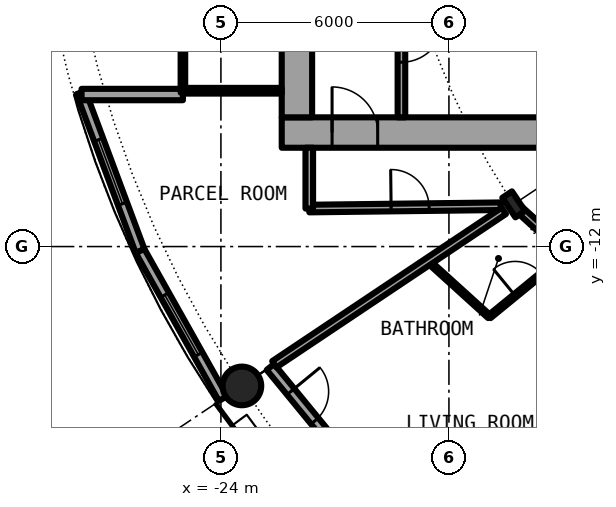
"""IFC4 building model, lengths in metres.
Left out: names, types, materials, properties, quantities, classifications, styles, units other than length and angle.
Written with IfcOpenShell. Run it as: python <this file> out.ifc"""

import sys

from ifc_helpers import new_model, si_unit, direction, frame, frame_2d, origin, origin_2d, place, context, subcontext, project, spatial, rectangle, hollow_circle, i_section, extrude, element, fill, save


model = new_model("IFC4")
c1 = context("Model", 3, precision=1e-05, world=origin(), true_north=direction((0.0, 1.0)))
c2 = subcontext(c1, "Body", "Model", "MODEL_VIEW")
j1 = project(units=[si_unit("LENGTHUNIT", "METRE"), si_unit("PLANEANGLEUNIT", "RADIAN")], contexts=[c1])
p1 = place(None, origin())
s1 = spatial("IfcSite", under=j1, at=p1, CompositionType="ELEMENT")
p2 = place(p1, origin())
s2 = spatial("IfcBuilding", under=s1, at=p2, CompositionType="ELEMENT")
p3 = place(p2, frame((0.0, 0.0, 31.95)))
s3 = spatial("IfcBuildingStorey", under=s2, at=p3, CompositionType="ELEMENT", Elevation=31.95)
p4 = place(p3, frame((-23.448, -15.667, 0.0), z_axis=(0.0, 0.0, 1.0), x_axis=(1.0, 0.0, 0.0)))
e1 = element("IfcColumn", 1, at=p4, inside=s3, PredefinedType="COLUMN", context=c2, shape_type="SweptSolid", body=[
    extrude(hollow_circle(Radius=0.508, WallThickness=0.05, at=origin_2d()), origin(), (0.0, 0.0, 1.0), 3.05),
])
p5 = place(p3, frame((-16.297, -10.889, 0.0), z_axis=(0.0, 0.0, 1.0), x_axis=(-0.831469612303, -0.55557023302, 0.0)))
e2 = element("IfcColumn", 2, at=p5, inside=s3, PredefinedType="COLUMN", context=c2, shape_type="SweptSolid", body=[
    extrude(i_section(OverallWidth=0.305, OverallDepth=0.62, WebThickness=0.021, FlangeThickness=0.04, FilletRadius=0.027, at=origin_2d()), origin(), (0.0, 0.0, 1.0), 3.05),
])
p6 = place(p3, frame((-22.699, -15.167, 0.0), z_axis=(0.0, 0.0, 1.0), x_axis=(0.634382322723, -0.773019449054, 0.0)))
e3 = element("IfcWall", 3, at=p6, inside=s3, PredefinedType="SOLIDWALL", context=c2, shape_type="SweptSolid", body=[
    extrude(rectangle(XDim=5.352, YDim=0.25, at=frame_2d((2.676, 0.0))), origin(), (0.0, 0.0, 1.0), 2.7),
])
p7 = place(p6, frame((0.841, 0.0, 0.0)))
e4 = element("IfcOpeningElement", 4, at=p7, cuts=e3, PredefinedType="OPENING", context=c2, shape_type="SweptSolid", body=[
    extrude(rectangle(XDim=1.0, YDim=2.2, at=frame_2d((0.5, 1.1))), frame((0.0, 0.135, 0.0), z_axis=(0.0, -1.0, 0.0), x_axis=(1.0, 0.0, 0.0)), (0.0, 0.0, 1.0), 0.27),
])
p8 = place(p6, frame((3.111, 0.0, 0.3)))
e5 = element("IfcOpeningElement", 5, at=p8, cuts=e3, PredefinedType="OPENING", context=c2, shape_type="SweptSolid", body=[
    extrude(rectangle(XDim=1.8, YDim=2.1, at=frame_2d((0.9, 1.05))), frame((0.0, 0.135, 0.0), z_axis=(0.0, -1.0, 0.0), x_axis=(1.0, 0.0, 0.0)), (0.0, 0.0, 1.0), 0.27),
])
p9 = place(p3, frame((-27.682, -7.945, 0.0), z_axis=(0.0, 0.0, 1.0), x_axis=(0.349247811493, -0.937030397675, 0.0)))
e6 = element("IfcWall", 6, at=p9, inside=s3, PredefinedType="SOLIDWALL", context=c2, shape_type="SweptSolid", body=[
    extrude(rectangle(XDim=4.452, YDim=0.25, at=frame_2d((2.226, 0.0))), origin(), (0.0, 0.0, 1.0), 2.7),
])
p10 = place(p9, frame((1.327, 0.0, 0.3)))
e7 = element("IfcOpeningElement", 7, at=p10, cuts=e6, PredefinedType="OPENING", context=c2, shape_type="SweptSolid", body=[
    extrude(rectangle(XDim=1.8, YDim=2.1, at=frame_2d((0.9, 1.05))), frame((0.0, 0.135, 0.0), z_axis=(0.0, -1.0, 0.0), x_axis=(1.0, 0.0, 0.0)), (0.0, 0.0, 1.0), 0.27),
])
p11 = place(p3, frame((-26.127, -12.117, 0.0), z_axis=(0.0, 0.0, 1.0), x_axis=(0.489696356642, -0.871893042919, 0.0)))
e8 = element("IfcWall", 8, at=p11, inside=s3, PredefinedType="SOLIDWALL", context=c2, shape_type="SweptSolid", body=[
    extrude(rectangle(XDim=4.454, YDim=0.25, at=frame_2d((2.227, 0.0))), origin(), (0.0, 0.0, 1.0), 2.7),
])
p12 = place(p11, frame((1.327, 0.0, 0.3)))
e9 = element("IfcOpeningElement", 9, at=p12, cuts=e8, PredefinedType="OPENING", context=c2, shape_type="SweptSolid", body=[
    extrude(rectangle(XDim=1.8, YDim=2.1, at=frame_2d((0.9, 1.05))), frame((0.0, 0.135, 0.0), z_axis=(0.0, -1.0, 0.0), x_axis=(1.0, 0.0, 0.0)), (0.0, 0.0, 1.0), 0.27),
])
p13 = place(p3, frame((-25.0, -8.0, 0.0), z_axis=(0.0, 0.0, 1.0), x_axis=(-1.0, 0.0, 0.0)))
e10 = element("IfcWall", 10, at=p13, inside=s3, PredefinedType="SOLIDWALL", context=c2, shape_type="SweptSolid", body=[
    extrude(rectangle(XDim=2.667, YDim=0.3, at=frame_2d((1.333, 0.0))), origin(), (0.0, 0.0, 1.0), 2.7),
])
p14 = place(p3, frame((-22.4, -9.0, 0.0), z_axis=(0.0, 0.0, 1.0), x_axis=(1.0, 0.0, 0.0)))
e11 = element("IfcWall", 11, at=p14, inside=s3, PredefinedType="SHEAR", context=c2, shape_type="SweptSolid", body=[
    extrude(rectangle(XDim=14.2, YDim=0.8, at=frame_2d((7.1, 0.0))), origin(), (0.0, 0.0, 1.0), 3.05),
])
p15 = place(p14, frame((1.325, 0.0, 0.0)))
e12 = element("IfcOpeningElement", 12, at=p15, cuts=e11, PredefinedType="OPENING", context=c2, shape_type="SweptSolid", body=[
    extrude(rectangle(XDim=1.2, YDim=2.3, at=frame_2d((0.6, 1.15))), frame((0.0, 0.41, 0.0), z_axis=(0.0, -1.0, 0.0), x_axis=(1.0, 0.0, 0.0)), (0.0, 0.0, 1.0), 0.82),
])
p16 = place(p3, frame((-22.0, -8.6, 0.0), z_axis=(0.0, 0.0, 1.0), x_axis=(0.0, 1.0, 0.0)))
e13 = element("IfcWall", 13, at=p16, inside=s3, PredefinedType="SHEAR", context=c2, shape_type="SweptSolid", body=[
    extrude(rectangle(XDim=17.2, YDim=0.8, at=frame_2d((8.6, 0.0))), origin(), (0.0, 0.0, 1.0), 3.05),
])
p17 = place(p16, frame((7.7, 0.0, 0.0)))
e14 = element("IfcOpeningElement", 14, at=p17, cuts=e13, PredefinedType="OPENING", context=c2, shape_type="SweptSolid", body=[
    extrude(rectangle(XDim=1.8, YDim=2.3, at=frame_2d((0.9, 1.15))), frame((0.0, 0.41, 0.0), z_axis=(0.0, -1.0, 0.0), x_axis=(1.0, 0.0, 0.0)), (0.0, 0.0, 1.0), 0.82),
])
p18 = place(p3, frame((-19.25, -1.575, 0.0), z_axis=(0.0, 0.0, 1.0), x_axis=(0.0, -1.0, 0.0)))
e15 = element("IfcWall", 15, at=p18, inside=s3, PredefinedType="SOLIDWALL", context=c2, shape_type="SweptSolid", body=[
    extrude(rectangle(XDim=7.025, YDim=0.2, at=frame_2d((3.513, 0.0))), origin(), (0.0, 0.0, 1.0), 2.7),
])
p19 = place(p18, frame((4.475, 0.0, 0.0)))
e16 = element("IfcOpeningElement", 16, at=p19, cuts=e15, PredefinedType="OPENING", context=c2, shape_type="SweptSolid", body=[
    extrude(rectangle(XDim=1.1, YDim=2.3, at=frame_2d((0.55, 1.15))), frame((0.0, 0.11, 0.0), z_axis=(0.0, -1.0, 0.0), x_axis=(1.0, 0.0, 0.0)), (0.0, 0.0, 1.0), 0.22),
])
p20 = place(p3, frame((-22.4, -7.9, 0.0), z_axis=(0.0, 0.0, 1.0), x_axis=(-1.0, 0.0, 0.0)))
e17 = element("IfcWall", 17, at=p20, inside=s3, PredefinedType="PARTITIONING", context=c2, shape_type="SweptSolid", body=[
    extrude(rectangle(XDim=2.54, YDim=0.15, at=frame_2d((1.27, 0.0))), origin(), (0.0, 0.0, 1.0), 2.7),
])
p21 = place(p3, frame((-25.0, 7.95, 0.0), z_axis=(0.0, 0.0, 1.0), x_axis=(0.0, -1.0, 0.0)))
e18 = element("IfcWall", 18, at=p21, inside=s3, PredefinedType="PARTITIONING", context=c2, shape_type="SweptSolid", body=[
    extrude(rectangle(XDim=15.9, YDim=0.12, at=frame_2d((7.95, 0.0))), origin(), (0.0, 0.0, 1.0), 2.7),
])
p22 = place(p21, frame((0.95, 0.0, 0.1)))
e19 = element("IfcOpeningElement", 19, at=p22, cuts=e18, PredefinedType="OPENING", context=c2, shape_type="SweptSolid", body=[
    extrude(rectangle(XDim=14.0, YDim=2.35, at=frame_2d((7.0, 1.175))), frame((0.0, 0.07, 0.0), z_axis=(0.0, -1.0, 0.0), x_axis=(1.0, 0.0, 0.0)), (0.0, 0.0, 1.0), 0.14),
])
p23 = place(p3, frame((-18.542, -12.389, 0.0), z_axis=(0.0, 0.0, 1.0), x_axis=(0.740836325503, -0.671685595212, 0.0)))
e20 = element("IfcWall", 20, at=p23, inside=s3, PredefinedType="PARTITIONING", context=c2, shape_type="SweptSolid", body=[
    extrude(rectangle(XDim=2.168, YDim=0.1, at=frame_2d((1.084, 0.0))), origin(), (0.0, 0.0, 1.0), 2.7),
])
p24 = place(p3, frame((-16.18, -10.994, 0.0), z_axis=(0.0, 0.0, 1.0), x_axis=(0.74089212117, -0.671624050186, 0.0)))
e21 = element("IfcWall", 21, at=p24, inside=s3, PredefinedType="PARTITIONING", context=c2, shape_type="SweptSolid", body=[
    extrude(rectangle(XDim=9.368, YDim=0.2, at=frame_2d((4.684, 0.0))), origin(), (0.0, 0.0, 1.0), 2.38),
])
p25 = place(p24, frame((3.153, 0.0, 0.0)))
e22 = element("IfcOpeningElement", 22, at=p25, cuts=e21, PredefinedType="OPENING", context=c2, shape_type="SweptSolid", body=[
    extrude(rectangle(XDim=1.0, YDim=2.3, at=frame_2d((0.5, 1.15))), frame((0.0, 0.11, 0.0), z_axis=(0.0, -1.0, 0.0), x_axis=(1.0, 0.0, 0.0)), (0.0, 0.0, 1.0), 0.22),
])
p26 = place(p3, frame((-21.675, -11.0, 0.0), z_axis=(0.0, 0.0, 1.0), x_axis=(0.999926652916, 0.012111514691, 0.0)))
e23 = element("IfcWall", 23, at=p26, inside=s3, PredefinedType="PARTITIONING", context=c2, shape_type="SweptSolid", body=[
    extrude(rectangle(XDim=5.04, YDim=0.2, at=frame_2d((2.52, 0.0))), origin(), (0.0, 0.0, 1.0), 2.7),
])
p27 = place(p26, frame((2.154, 0.0, 0.0)))
e24 = element("IfcOpeningElement", 24, at=p27, cuts=e23, PredefinedType="OPENING", context=c2, shape_type="SweptSolid", body=[
    extrude(rectangle(XDim=1.0, YDim=2.3, at=frame_2d((0.5, 1.15))), frame((0.0, 0.11, 0.0), z_axis=(0.0, -1.0, 0.0), x_axis=(1.0, 0.0, 0.0)), (0.0, 0.0, 1.0), 0.22),
])
p28 = place(p3, frame((-22.595, -15.097, 0.0), z_axis=(0.0, 0.0, 1.0), x_axis=(0.831465568067, 0.555576285599, 0.0)))
e25 = element("IfcWall", 25, at=p28, inside=s3, PredefinedType="PARTITIONING", context=c2, shape_type="SweptSolid", body=[
    extrude(rectangle(XDim=7.264, YDim=0.2, at=frame_2d((3.632, 0.0))), origin(), (0.0, 0.0, 1.0), 2.7),
])
p29 = place(p3, frame((-17.219, -21.023, 0.0), z_axis=(0.0, 0.0, 1.0), x_axis=(0.633664062855, 0.773608334654, 0.0)))
e26 = element("IfcWall", 26, at=p29, inside=s3, PredefinedType="PARTITIONING", context=c2, shape_type="SweptSolid", body=[
    extrude(rectangle(XDim=8.138, YDim=0.1, at=frame_2d((4.069, 0.0))), origin(), (0.0, 0.0, 1.0), 2.7),
])
p30 = place(p29, frame((6.377, 0.0, 0.0)))
e27 = element("IfcOpeningElement", 27, at=p30, cuts=e26, PredefinedType="OPENING", context=c2, shape_type="SweptSolid", body=[
    extrude(rectangle(XDim=0.9, YDim=2.3, at=frame_2d((0.45, 1.15))), frame((0.0, 0.06, 0.0), z_axis=(0.0, -1.0, 0.0), x_axis=(1.0, 0.0, 0.0)), (0.0, 0.0, 1.0), 0.12),
])
p31 = place(p29, frame((2.308, 0.0, 0.0)))
e28 = element("IfcOpeningElement", 28, at=p31, cuts=e26, PredefinedType="OPENING", context=c2, shape_type="SweptSolid", body=[
    extrude(rectangle(XDim=0.9, YDim=2.3, at=frame_2d((0.45, 1.15))), frame((0.0, 0.06, 0.0), z_axis=(0.0, -1.0, 0.0), x_axis=(1.0, 0.0, 0.0)), (0.0, 0.0, 1.0), 0.12),
])
p32 = place(p3, frame((-16.936, -13.845, 0.0), z_axis=(0.0, 0.0, 1.0), x_axis=(0.774162545943, 0.632986850147, 0.0)))
e29 = element("IfcWall", 29, at=p32, inside=s3, PredefinedType="PARTITIONING", context=c2, shape_type="SweptSolid", body=[
    extrude(rectangle(XDim=2.649, YDim=0.1, at=frame_2d((1.325, 0.0))), origin(), (0.0, 0.0, 1.0), 2.7),
])
p33 = place(p32, frame((0.875, 0.0, 0.0)))
e30 = element("IfcOpeningElement", 30, at=p33, cuts=e29, PredefinedType="OPENING", context=c2, shape_type="SweptSolid", body=[
    extrude(rectangle(XDim=0.9, YDim=2.3, at=frame_2d((0.45, 1.15))), frame((0.0, 0.06, 0.0), z_axis=(0.0, -1.0, 0.0), x_axis=(1.0, 0.0, 0.0)), (0.0, 0.0, 1.0), 0.12),
])
p34 = place(p3, frame((-21.675, -11.0, 0.0), z_axis=(0.0, 0.0, 1.0), x_axis=(0.0, 1.0, 0.0)))
e31 = element("IfcWall", 31, at=p34, inside=s3, PredefinedType="PARTITIONING", context=c2, shape_type="SweptSolid", body=[
    extrude(rectangle(XDim=1.6, YDim=0.2, at=frame_2d((0.8, 0.0))), origin(), (0.0, 0.0, 1.0), 2.7),
])
p35 = place(p7, origin())
e32 = element("IfcDoor", 32, at=p35, inside=s3, OperationType="SINGLE_SWING_LEFT", PredefinedType="DOOR", context=c2, shape_type="SweptSolid", body=[
    extrude(rectangle(XDim=1.0, YDim=2.2, at=frame_2d((0.5, 1.1))), frame((0.0, 0.025, 0.0), z_axis=(0.0, -1.0, 0.0), x_axis=(1.0, 0.0, 0.0)), (0.0, 0.0, 1.0), 0.05),
])
fill(e4, e32)
p36 = place(p10, origin())
e33 = element("IfcWindow", 33, at=p36, inside=s3, PartitioningType="SINGLE_PANEL", PredefinedType="WINDOW", context=c2, shape_type="SweptSolid", body=[
    extrude(rectangle(XDim=1.8, YDim=2.1, at=frame_2d((0.9, 1.05))), frame((0.0, 0.03, 0.0), z_axis=(0.0, -1.0, 0.0), x_axis=(1.0, 0.0, 0.0)), (0.0, 0.0, 1.0), 0.06),
])
fill(e7, e33)
p37 = place(p12, origin())
e34 = element("IfcWindow", 34, at=p37, inside=s3, PartitioningType="SINGLE_PANEL", PredefinedType="WINDOW", context=c2, shape_type="SweptSolid", body=[
    extrude(rectangle(XDim=1.8, YDim=2.1, at=frame_2d((0.9, 1.05))), frame((0.0, 0.03, 0.0), z_axis=(0.0, -1.0, 0.0), x_axis=(1.0, 0.0, 0.0)), (0.0, 0.0, 1.0), 0.06),
])
fill(e9, e34)
p38 = place(p19, origin())
e35 = element("IfcDoor", 35, at=p38, inside=s3, OperationType="SINGLE_SWING_LEFT", PredefinedType="DOOR", context=c2, shape_type="SweptSolid", body=[
    extrude(rectangle(XDim=1.1, YDim=2.3, at=frame_2d((0.55, 1.15))), frame((0.0, 0.025, 0.0), z_axis=(0.0, -1.0, 0.0), x_axis=(1.0, 0.0, 0.0)), (0.0, 0.0, 1.0), 0.05),
])
fill(e16, e35)
p39 = place(p15, origin())
e36 = element("IfcDoor", 36, at=p39, inside=s3, OperationType="SINGLE_SWING_RIGHT", PredefinedType="DOOR", context=c2, shape_type="SweptSolid", body=[
    extrude(rectangle(XDim=1.2, YDim=2.3, at=frame_2d((0.6, 1.15))), frame((0.0, 0.025, 0.0), z_axis=(0.0, -1.0, 0.0), x_axis=(1.0, 0.0, 0.0)), (0.0, 0.0, 1.0), 0.05),
])
fill(e12, e36)
p40 = place(p22, origin())
e37 = element("IfcWindow", 37, at=p40, inside=s3, PartitioningType="SINGLE_PANEL", PredefinedType="WINDOW", context=c2, shape_type="SweptSolid", body=[
    extrude(rectangle(XDim=14.0, YDim=2.35, at=frame_2d((7.0, 1.175))), frame((0.0, 0.03, 0.0), z_axis=(0.0, -1.0, 0.0), x_axis=(1.0, 0.0, 0.0)), (0.0, 0.0, 1.0), 0.06),
])
fill(e19, e37)
p41 = place(p33, origin())
e38 = element("IfcDoor", 38, at=p41, inside=s3, OperationType="SINGLE_SWING_LEFT", PredefinedType="DOOR", context=c2, shape_type="SweptSolid", body=[
    extrude(rectangle(XDim=0.9, YDim=2.3, at=frame_2d((0.45, 1.15))), frame((0.0, 0.025, 0.0), z_axis=(0.0, -1.0, 0.0), x_axis=(1.0, 0.0, 0.0)), (0.0, 0.0, 1.0), 0.05),
])
fill(e30, e38)
p42 = place(p27, origin())
e39 = element("IfcDoor", 39, at=p42, inside=s3, OperationType="SINGLE_SWING_RIGHT", PredefinedType="DOOR", context=c2, shape_type="SweptSolid", body=[
    extrude(rectangle(XDim=1.0, YDim=2.3, at=frame_2d((0.5, 1.15))), frame((0.0, 0.025, 0.0), z_axis=(0.0, -1.0, 0.0), x_axis=(1.0, 0.0, 0.0)), (0.0, 0.0, 1.0), 0.05),
])
fill(e24, e39)
save(model, sys.argv[1])
